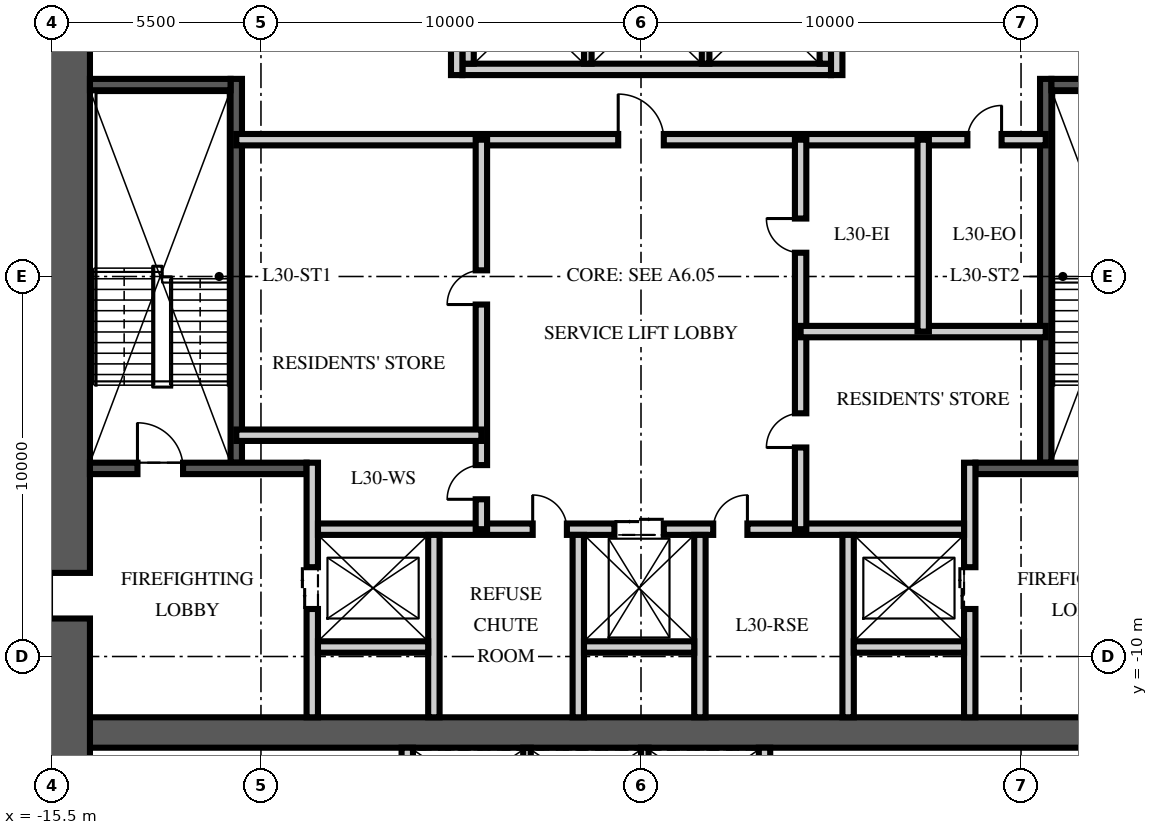
"""IFC4 building model, lengths in metres.
Left out: names, types, materials, properties, quantities, classifications, styles, units other than length and angle.
Written with IfcOpenShell. Run it as: python <this file> out.ifc"""

import sys

from ifc_helpers import new_model, si_unit, direction, frame, frame_2d, origin, place, context, subcontext, project, spatial, rectangle, extrude, element, fill, save


model = new_model("IFC4")
c1 = context("Model", 3, precision=1e-05, world=origin(), true_north=direction((0.0, 1.0)))
c2 = subcontext(c1, "Body", "Model", "MODEL_VIEW")
j1 = project(units=[si_unit("LENGTHUNIT", "METRE"), si_unit("PLANEANGLEUNIT", "RADIAN")], contexts=[c1])
p1 = place(None, origin())
s1 = spatial("IfcSite", under=j1, at=p1, CompositionType="ELEMENT")
p2 = place(p1, origin())
s2 = spatial("IfcBuilding", under=s1, at=p2, CompositionType="ELEMENT")
p3 = place(p2, frame((0.0, 0.0, 122.25)))
s3 = spatial("IfcBuildingStorey", under=s2, at=p3, CompositionType="ELEMENT", Elevation=122.25)
p4 = place(p3, frame((-15.5, -12.0, -0.25), z_axis=(0.0, 0.0, 1.0), x_axis=(1.0, 0.0, 0.0)))
e1 = element("IfcWall", 1, at=p4, inside=s3, PredefinedType="SHEAR", context=c2, shape_type="SweptSolid", body=[
    extrude(rectangle(XDim=31.0, YDim=0.8, at=frame_2d((15.5, 0.0))), origin(), (0.0, 0.0, 1.0), 3.75),
])
p5 = place(p3, frame((-15.5, -15.5, -0.25), z_axis=(0.0, 0.0, 1.0), x_axis=(0.0, 1.0, 0.0)))
e2 = element("IfcWall", 2, at=p5, inside=s3, PredefinedType="SHEAR", context=c2, shape_type="SweptSolid", body=[
    extrude(rectangle(XDim=31.0, YDim=2.0, at=frame_2d((15.5, 0.0))), origin(), (0.0, 0.0, 1.0), 3.75),
])
p6 = place(p5, frame((6.5, 0.0, 0.25)))
e3 = element("IfcOpeningElement", 3, at=p6, cuts=e2, PredefinedType="OPENING", context=c2, shape_type="SweptSolid", body=[
    extrude(rectangle(XDim=1.2, YDim=2.1, at=frame_2d((0.6, 1.05))), frame((0.0, 1.01, 0.0), z_axis=(0.0, -1.0, 0.0), x_axis=(1.0, 0.0, 0.0)), (0.0, 0.0, 1.0), 2.02),
])
p7 = place(p5, frame((23.0, 0.0, 0.25)))
e4 = element("IfcOpeningElement", 4, at=p7, cuts=e2, PredefinedType="OPENING", context=c2, shape_type="SweptSolid", body=[
    extrude(rectangle(XDim=1.8, YDim=2.1, at=frame_2d((0.9, 1.05))), frame((0.0, 1.01, 0.0), z_axis=(0.0, -1.0, 0.0), x_axis=(1.0, 0.0, 0.0)), (0.0, 0.0, 1.0), 2.02),
])
p8 = place(p3, frame((-10.65, -4.9, 0.0), z_axis=(0.0, 0.0, 1.0), x_axis=(0.0, 1.0, 0.0)))
e5 = element("IfcWall", 5, at=p8, inside=s3, PredefinedType="SOLIDWALL", context=c2, shape_type="SweptSolid", body=[
    extrude(rectangle(XDim=10.1, YDim=0.3, at=frame_2d((5.05, 0.0))), origin(), (0.0, 0.0, 1.0), 3.5),
])
p9 = place(p3, frame((-14.5, -5.05, 0.0), z_axis=(0.0, 0.0, 1.0), x_axis=(1.0, 0.0, 0.0)))
e6 = element("IfcWall", 6, at=p9, inside=s3, PredefinedType="SOLIDWALL", context=c2, shape_type="SweptSolid", body=[
    extrude(rectangle(XDim=5.7, YDim=0.3, at=frame_2d((2.85, 0.0))), origin(), (0.0, 0.0, 1.0), 3.5),
])
p10 = place(p9, frame((1.25, 0.0, 0.0)))
e7 = element("IfcOpeningElement", 7, at=p10, cuts=e6, PredefinedType="OPENING", context=c2, shape_type="SweptSolid", body=[
    extrude(rectangle(XDim=1.2, YDim=2.1, at=frame_2d((0.6, 1.05))), frame((0.0, 0.16, 0.0), z_axis=(0.0, -1.0, 0.0), x_axis=(1.0, 0.0, 0.0)), (0.0, 0.0, 1.0), 0.32),
])
p11 = place(p3, frame((-14.5, 5.05, 0.0), z_axis=(0.0, 0.0, 1.0), x_axis=(1.0, 0.0, 0.0)))
e8 = element("IfcWall", 8, at=p11, inside=s3, PredefinedType="SOLIDWALL", context=c2, shape_type="SweptSolid", body=[
    extrude(rectangle(XDim=3.7, YDim=0.3, at=frame_2d((1.85, 0.0))), origin(), (0.0, 0.0, 1.0), 3.5),
])
p12 = place(p3, frame((-8.65, -11.6, 0.0), z_axis=(0.0, 0.0, 1.0), x_axis=(0.0, 1.0, 0.0)))
e9 = element("IfcWall", 9, at=p12, inside=s3, PredefinedType="PARTITIONING", context=c2, shape_type="SweptSolid", body=[
    extrude(rectangle(XDim=6.7, YDim=0.3, at=frame_2d((3.35, 0.0))), origin(), (0.0, 0.0, 1.0), 3.5),
])
p13 = place(p12, frame((2.85, 0.0, 0.0)))
e10 = element("IfcOpeningElement", 10, at=p13, cuts=e9, PredefinedType="OPENING", context=c2, shape_type="SweptSolid", body=[
    extrude(rectangle(XDim=1.1, YDim=2.1, at=frame_2d((0.55, 1.05))), frame((0.0, 0.16, 0.0), z_axis=(0.0, -1.0, 0.0), x_axis=(1.0, 0.0, 0.0)), (0.0, 0.0, 1.0), 0.32),
])
p14 = place(p3, frame((10.65, -4.9, 0.0), z_axis=(0.0, 0.0, 1.0), x_axis=(0.0, 1.0, 0.0)))
e11 = element("IfcWall", 11, at=p14, inside=s3, PredefinedType="SOLIDWALL", context=c2, shape_type="SweptSolid", body=[
    extrude(rectangle(XDim=10.1, YDim=0.3, at=frame_2d((5.05, 0.0))), origin(), (0.0, 0.0, 1.0), 3.5),
])
p15 = place(p3, frame((14.5, -5.05, 0.0), z_axis=(0.0, 0.0, 1.0), x_axis=(-1.0, 0.0, 0.0)))
e12 = element("IfcWall", 12, at=p15, inside=s3, PredefinedType="SOLIDWALL", context=c2, shape_type="SweptSolid", body=[
    extrude(rectangle(XDim=5.7, YDim=0.3, at=frame_2d((2.85, 0.0))), origin(), (0.0, 0.0, 1.0), 3.5),
])
p16 = place(p15, frame((1.25, 0.0, 0.0)))
e13 = element("IfcOpeningElement", 13, at=p16, cuts=e12, PredefinedType="OPENING", context=c2, shape_type="SweptSolid", body=[
    extrude(rectangle(XDim=1.2, YDim=2.1, at=frame_2d((0.6, 1.05))), frame((0.0, 0.16, 0.0), z_axis=(0.0, -1.0, 0.0), x_axis=(1.0, 0.0, 0.0)), (0.0, 0.0, 1.0), 0.32),
])
p17 = place(p3, frame((14.5, 5.05, 0.0), z_axis=(0.0, 0.0, 1.0), x_axis=(-1.0, 0.0, 0.0)))
e14 = element("IfcWall", 14, at=p17, inside=s3, PredefinedType="SOLIDWALL", context=c2, shape_type="SweptSolid", body=[
    extrude(rectangle(XDim=3.7, YDim=0.3, at=frame_2d((1.85, 0.0))), origin(), (0.0, 0.0, 1.0), 3.5),
])
p18 = place(p3, frame((8.65, -11.6, 0.0), z_axis=(0.0, 0.0, 1.0), x_axis=(0.0, 1.0, 0.0)))
e15 = element("IfcWall", 15, at=p18, inside=s3, PredefinedType="PARTITIONING", context=c2, shape_type="SweptSolid", body=[
    extrude(rectangle(XDim=6.7, YDim=0.3, at=frame_2d((3.35, 0.0))), origin(), (0.0, 0.0, 1.0), 3.5),
])
p19 = place(p18, frame((2.85, 0.0, 0.0)))
e16 = element("IfcOpeningElement", 16, at=p19, cuts=e15, PredefinedType="OPENING", context=c2, shape_type="SweptSolid", body=[
    extrude(rectangle(XDim=1.1, YDim=2.1, at=frame_2d((0.55, 1.05))), frame((0.0, 0.16, 0.0), z_axis=(0.0, -1.0, 0.0), x_axis=(1.0, 0.0, 0.0)), (0.0, 0.0, 1.0), 0.32),
])
p20 = place(p3, frame((-8.5, -6.65, 0.0), z_axis=(0.0, 0.0, 1.0), x_axis=(1.0, 0.0, 0.0)))
e17 = element("IfcWall", 17, at=p20, inside=s3, PredefinedType="PARTITIONING", context=c2, shape_type="SweptSolid", body=[
    extrude(rectangle(XDim=17.0, YDim=0.3, at=frame_2d((8.5, 0.0))), origin(), (0.0, 0.0, 1.0), 3.5),
])
p21 = place(p20, frame((7.8, 0.0, 0.0)))
e18 = element("IfcOpeningElement", 18, at=p21, cuts=e17, PredefinedType="OPENING", context=c2, shape_type="SweptSolid", body=[
    extrude(rectangle(XDim=1.3, YDim=2.4, at=frame_2d((0.65, 1.2))), frame((0.0, 0.16, 0.0), z_axis=(0.0, -1.0, 0.0), x_axis=(1.0, 0.0, 0.0)), (0.0, 0.0, 1.0), 0.32),
])
p22 = place(p20, frame((5.65, 0.0, 0.0)))
e19 = element("IfcOpeningElement", 19, at=p22, cuts=e17, PredefinedType="OPENING", context=c2, shape_type="SweptSolid", body=[
    extrude(rectangle(XDim=0.9, YDim=2.1, at=frame_2d((0.45, 1.05))), frame((0.0, 0.16, 0.0), z_axis=(0.0, -1.0, 0.0), x_axis=(1.0, 0.0, 0.0)), (0.0, 0.0, 1.0), 0.32),
])
p23 = place(p20, frame((10.4, 0.0, 0.0)))
e20 = element("IfcOpeningElement", 20, at=p23, cuts=e17, PredefinedType="OPENING", context=c2, shape_type="SweptSolid", body=[
    extrude(rectangle(XDim=0.9, YDim=2.1, at=frame_2d((0.45, 1.05))), frame((0.0, 0.16, 0.0), z_axis=(0.0, -1.0, 0.0), x_axis=(1.0, 0.0, 0.0)), (0.0, 0.0, 1.0), 0.32),
])
for number, where, z_axis, x_axis in (
    (21, (-5.45, -11.6, 0.0), (0.0, 0.0, 1.0), (0.0, 1.0, 0.0)),
    (22, (-1.65, -11.6, 0.0), (0.0, 0.0, 1.0), (0.0, 1.0, 0.0)),
    (23, (1.55, -11.6, 0.0), (0.0, 0.0, 1.0), (0.0, 1.0, 0.0)),
    (24, (5.45, -11.6, 0.0), (0.0, 0.0, 1.0), (0.0, 1.0, 0.0)),
):
    element("IfcWall", number, at=place(p3, frame(where, z_axis=z_axis, x_axis=x_axis)), inside=s3, PredefinedType="PARTITIONING", context=c2, shape_type="SweptSolid", body=[
        extrude(rectangle(XDim=4.8, YDim=0.3, at=frame_2d((2.4, 0.0))), origin(), (0.0, 0.0, 1.0), 3.5),
    ])
for number, where, z_axis, x_axis in (
    (25, (-8.5, -9.75, 0.0), (0.0, 0.0, 1.0), (1.0, 0.0, 0.0)),
    (26, (-1.5, -9.75, 0.0), (0.0, 0.0, 1.0), (1.0, 0.0, 0.0)),
    (27, (5.6, -9.75, 0.0), (0.0, 0.0, 1.0), (1.0, 0.0, 0.0)),
):
    element("IfcWall", number, at=place(p3, frame(where, z_axis=z_axis, x_axis=x_axis)), inside=s3, PredefinedType="PARTITIONING", context=c2, shape_type="SweptSolid", body=[
        extrude(rectangle(XDim=2.9, YDim=0.3, at=frame_2d((1.45, 0.0))), origin(), (0.0, 0.0, 1.0), 3.5),
    ])
p24 = place(p3, frame((-4.7, 5.45, 0.0), z_axis=(0.0, 0.0, 1.0), x_axis=(1.0, 0.0, 0.0)))
e28 = element("IfcWall", 28, at=p24, inside=s3, PredefinedType="PARTITIONING", context=c2, shape_type="SweptSolid", body=[
    extrude(rectangle(XDim=9.7, YDim=0.3, at=frame_2d((4.85, 0.0))), origin(), (0.0, 0.0, 1.0), 3.5),
])
for number, where, z_axis, x_axis in (
    (29, (-4.55, 5.6, 0.0), (0.0, 0.0, 1.0), (0.0, 1.0, 0.0)),
    (30, (4.85, 5.6, 0.0), (0.0, 0.0, 1.0), (0.0, 1.0, 0.0)),
):
    element("IfcWall", number, at=place(p3, frame(where, z_axis=z_axis, x_axis=x_axis)), inside=s3, PredefinedType="PARTITIONING", context=c2, shape_type="SweptSolid", body=[
        extrude(rectangle(XDim=2.8, YDim=0.3, at=frame_2d((1.4, 0.0))), origin(), (0.0, 0.0, 1.0), 3.5),
    ])
for number, where, z_axis, x_axis in (
    (31, (-1.4, 5.6, 0.0), (0.0, 0.0, 1.0), (0.0, 1.0, 0.0)),
    (32, (1.7, 5.6, 0.0), (0.0, 0.0, 1.0), (0.0, 1.0, 0.0)),
):
    element("IfcWall", number, at=place(p3, frame(where, z_axis=z_axis, x_axis=x_axis)), inside=s3, PredefinedType="PARTITIONING", context=c2, shape_type="SweptSolid", body=[
        extrude(rectangle(XDim=2.8, YDim=0.2, at=frame_2d((1.4, 0.0))), origin(), (0.0, 0.0, 1.0), 3.5),
    ])
for number, where, z_axis, x_axis in (
    (33, (-6.15, -14.5, 0.0), (0.0, 0.0, 1.0), (0.0, 1.0, 0.0)),
    (34, (3.25, -14.5, 0.0), (0.0, 0.0, 1.0), (0.0, 1.0, 0.0)),
):
    element("IfcWall", number, at=place(p3, frame(where, z_axis=z_axis, x_axis=x_axis)), inside=s3, PredefinedType="PARTITIONING", context=c2, shape_type="SweptSolid", body=[
        extrude(rectangle(XDim=2.1, YDim=0.3, at=frame_2d((1.05, 0.0))), origin(), (0.0, 0.0, 1.0), 3.5),
    ])
for number, where, z_axis, x_axis in (
    (35, (-3.0, -14.5, 0.0), (0.0, 0.0, 1.0), (0.0, 1.0, 0.0)),
    (36, (0.1, -14.5, 0.0), (0.0, 0.0, 1.0), (0.0, 1.0, 0.0)),
):
    element("IfcWall", number, at=place(p3, frame(where, z_axis=z_axis, x_axis=x_axis)), inside=s3, PredefinedType="PARTITIONING", context=c2, shape_type="SweptSolid", body=[
        extrude(rectangle(XDim=2.1, YDim=0.2, at=frame_2d((1.05, 0.0))), origin(), (0.0, 0.0, 1.0), 3.5),
    ])
p25 = place(p3, frame((-10.65, 3.6, 0.0), z_axis=(0.0, 0.0, 1.0), x_axis=(1.0, 0.0, 0.0)))
e37 = element("IfcWall", 37, at=p25, inside=s3, PredefinedType="PARTITIONING", context=c2, shape_type="SweptSolid", body=[
    extrude(rectangle(XDim=21.3, YDim=0.3, at=frame_2d((10.65, 0.0))), origin(), (0.0, 0.0, 1.0), 3.5),
])
p26 = place(p25, frame((10.05, 0.0, 0.0)))
e38 = element("IfcOpeningElement", 38, at=p26, cuts=e37, PredefinedType="OPENING", context=c2, shape_type="SweptSolid", body=[
    extrude(rectangle(XDim=1.2, YDim=2.1, at=frame_2d((0.6, 1.05))), frame((0.0, 0.16, 0.0), z_axis=(0.0, -1.0, 0.0), x_axis=(1.0, 0.0, 0.0)), (0.0, 0.0, 1.0), 0.32),
])
p27 = place(p25, frame((19.238, 0.0, 0.0)))
e39 = element("IfcOpeningElement", 39, at=p27, cuts=e37, PredefinedType="OPENING", context=c2, shape_type="SweptSolid", body=[
    extrude(rectangle(XDim=0.9, YDim=2.1, at=frame_2d((0.45, 1.05))), frame((0.0, 0.16, 0.0), z_axis=(0.0, -1.0, 0.0), x_axis=(1.0, 0.0, 0.0)), (0.0, 0.0, 1.0), 0.32),
])
p28 = place(p3, frame((-4.2, -6.65, 0.0), z_axis=(0.0, 0.0, 1.0), x_axis=(0.0, 1.0, 0.0)))
e40 = element("IfcWall", 40, at=p28, inside=s3, PredefinedType="PARTITIONING", context=c2, shape_type="SweptSolid", body=[
    extrude(rectangle(XDim=10.25, YDim=0.3, at=frame_2d((5.125, 0.0))), origin(), (0.0, 0.0, 1.0), 3.5),
])
p29 = place(p28, frame((0.787, 0.0, 0.0)))
e41 = element("IfcOpeningElement", 41, at=p29, cuts=e40, PredefinedType="OPENING", context=c2, shape_type="SweptSolid", body=[
    extrude(rectangle(XDim=0.9, YDim=2.1, at=frame_2d((0.45, 1.05))), frame((0.0, 0.16, 0.0), z_axis=(0.0, -1.0, 0.0), x_axis=(1.0, 0.0, 0.0)), (0.0, 0.0, 1.0), 0.32),
])
p30 = place(p28, frame((5.912, 0.0, 0.0)))
e42 = element("IfcOpeningElement", 42, at=p30, cuts=e40, PredefinedType="OPENING", context=c2, shape_type="SweptSolid", body=[
    extrude(rectangle(XDim=0.9, YDim=2.1, at=frame_2d((0.45, 1.05))), frame((0.0, 0.16, 0.0), z_axis=(0.0, -1.0, 0.0), x_axis=(1.0, 0.0, 0.0)), (0.0, 0.0, 1.0), 0.32),
])
p31 = place(p3, frame((4.2, -6.65, 0.0), z_axis=(0.0, 0.0, 1.0), x_axis=(0.0, 1.0, 0.0)))
e43 = element("IfcWall", 43, at=p31, inside=s3, PredefinedType="PARTITIONING", context=c2, shape_type="SweptSolid", body=[
    extrude(rectangle(XDim=10.25, YDim=0.3, at=frame_2d((5.125, 0.0))), origin(), (0.0, 0.0, 1.0), 3.5),
])
p32 = place(p31, frame((2.15, 0.0, 0.0)))
e44 = element("IfcOpeningElement", 44, at=p32, cuts=e43, PredefinedType="OPENING", context=c2, shape_type="SweptSolid", body=[
    extrude(rectangle(XDim=0.9, YDim=2.1, at=frame_2d((0.45, 1.05))), frame((0.0, 0.16, 0.0), z_axis=(0.0, -1.0, 0.0), x_axis=(1.0, 0.0, 0.0)), (0.0, 0.0, 1.0), 0.32),
])
p33 = place(p31, frame((7.275, 0.0, 0.0)))
e45 = element("IfcOpeningElement", 45, at=p33, cuts=e43, PredefinedType="OPENING", context=c2, shape_type="SweptSolid", body=[
    extrude(rectangle(XDim=0.9, YDim=2.1, at=frame_2d((0.45, 1.05))), frame((0.0, 0.16, 0.0), z_axis=(0.0, -1.0, 0.0), x_axis=(1.0, 0.0, 0.0)), (0.0, 0.0, 1.0), 0.32),
])
for number, where, z_axis, x_axis in (
    (46, (-10.65, -4.177, 0.0), (0.0, 0.0, 1.0), (1.0, 0.0, 0.0)),
    (47, (10.65, -1.45, 0.0), (0.0, 0.0, 1.0), (-1.0, 0.0, 0.0)),
):
    element("IfcWall", number, at=place(p3, frame(where, z_axis=z_axis, x_axis=x_axis)), inside=s3, PredefinedType="PARTITIONING", context=c2, shape_type="SweptSolid", body=[
        extrude(rectangle(XDim=6.45, YDim=0.3, at=frame_2d((3.225, 0.0))), origin(), (0.0, 0.0, 1.0), 3.5),
    ])
p34 = place(p3, frame((7.425, -1.45, 0.0), z_axis=(0.0, 0.0, 1.0), x_axis=(0.0, 1.0, 0.0)))
e48 = element("IfcWall", 48, at=p34, inside=s3, PredefinedType="PARTITIONING", context=c2, shape_type="SweptSolid", body=[
    extrude(rectangle(XDim=5.05, YDim=0.3, at=frame_2d((2.525, 0.0))), origin(), (0.0, 0.0, 1.0), 3.5),
])
p35 = place(p3, frame((-4.85, 5.3, 0.0), z_axis=(0.0, 0.0, 1.0), x_axis=(0.0, 1.0, 0.0)))
e49 = element("IfcWall", 49, at=p35, inside=s3, PredefinedType="PARTITIONING", context=c2, shape_type="SweptSolid", body=[
    extrude(rectangle(XDim=6.3, YDim=0.3, at=frame_2d((3.15, 0.0))), origin(), (0.0, 0.0, 1.0), 3.5),
])
p36 = place(p35, frame((4.35, 0.0, 0.0)))
e50 = element("IfcOpeningElement", 50, at=p36, cuts=e49, PredefinedType="OPENING", context=c2, shape_type="SweptSolid", body=[
    extrude(rectangle(XDim=0.9, YDim=2.1, at=frame_2d((0.45, 1.05))), frame((0.0, 0.16, 0.0), z_axis=(0.0, -1.0, 0.0), x_axis=(1.0, 0.0, 0.0)), (0.0, 0.0, 1.0), 0.32),
])
p37 = place(p3, frame((5.15, 5.3, 0.0), z_axis=(0.0, 0.0, 1.0), x_axis=(0.0, 1.0, 0.0)))
e51 = element("IfcWall", 51, at=p37, inside=s3, PredefinedType="PARTITIONING", context=c2, shape_type="SweptSolid", body=[
    extrude(rectangle(XDim=6.3, YDim=0.3, at=frame_2d((3.15, 0.0))), origin(), (0.0, 0.0, 1.0), 3.5),
])
p38 = place(p37, frame((4.35, 0.0, 0.0)))
e52 = element("IfcOpeningElement", 52, at=p38, cuts=e51, PredefinedType="OPENING", context=c2, shape_type="SweptSolid", body=[
    extrude(rectangle(XDim=0.9, YDim=2.1, at=frame_2d((0.45, 1.05))), frame((0.0, 0.16, 0.0), z_axis=(0.0, -1.0, 0.0), x_axis=(1.0, 0.0, 0.0)), (0.0, 0.0, 1.0), 0.32),
])
p39 = place(p10, origin())
e53 = element("IfcDoor", 53, at=p39, inside=s3, OperationType="SINGLE_SWING_LEFT", PredefinedType="DOOR", context=c2, shape_type="SweptSolid", body=[
    extrude(rectangle(XDim=1.2, YDim=2.1, at=frame_2d((0.6, 1.05))), frame((0.0, 0.025, 0.0), z_axis=(0.0, -1.0, 0.0), x_axis=(1.0, 0.0, 0.0)), (0.0, 0.0, 1.0), 0.05),
])
fill(e7, e53)
p40 = place(p6, origin())
e54 = element("IfcDoor", 54, at=p40, inside=s3, OperationType="SINGLE_SWING_LEFT", PredefinedType="DOOR", context=c2, shape_type="SweptSolid", body=[
    extrude(rectangle(XDim=1.2, YDim=2.1, at=frame_2d((0.6, 1.05))), frame((0.0, 0.025, 0.0), z_axis=(0.0, -1.0, 0.0), x_axis=(1.0, 0.0, 0.0)), (0.0, 0.0, 1.0), 0.05),
])
fill(e3, e54)
p41 = place(p13, origin())
e55 = element("IfcDoor", 55, at=p41, inside=s3, OperationType="DOUBLE_DOOR_SLIDING", PredefinedType="DOOR", context=c2, shape_type="SweptSolid", body=[
    extrude(rectangle(XDim=1.1, YDim=2.1, at=frame_2d((0.55, 1.05))), frame((0.0, 0.025, 0.0), z_axis=(0.0, -1.0, 0.0), x_axis=(1.0, 0.0, 0.0)), (0.0, 0.0, 1.0), 0.05),
])
fill(e10, e55)
p42 = place(p19, origin())
e56 = element("IfcDoor", 56, at=p42, inside=s3, OperationType="DOUBLE_DOOR_SLIDING", PredefinedType="DOOR", context=c2, shape_type="SweptSolid", body=[
    extrude(rectangle(XDim=1.1, YDim=2.1, at=frame_2d((0.55, 1.05))), frame((0.0, 0.025, 0.0), z_axis=(0.0, -1.0, 0.0), x_axis=(1.0, 0.0, 0.0)), (0.0, 0.0, 1.0), 0.05),
])
fill(e16, e56)
p43 = place(p21, origin())
e57 = element("IfcDoor", 57, at=p43, inside=s3, OperationType="DOUBLE_DOOR_SLIDING", PredefinedType="DOOR", context=c2, shape_type="SweptSolid", body=[
    extrude(rectangle(XDim=1.3, YDim=2.4, at=frame_2d((0.65, 1.2))), frame((0.0, 0.025, 0.0), z_axis=(0.0, -1.0, 0.0), x_axis=(1.0, 0.0, 0.0)), (0.0, 0.0, 1.0), 0.05),
])
fill(e18, e57)
p44 = place(p26, origin())
e58 = element("IfcDoor", 58, at=p44, inside=s3, OperationType="SINGLE_SWING_LEFT", PredefinedType="DOOR", context=c2, shape_type="SweptSolid", body=[
    extrude(rectangle(XDim=1.2, YDim=2.1, at=frame_2d((0.6, 1.05))), frame((0.0, 0.025, 0.0), z_axis=(0.0, -1.0, 0.0), x_axis=(1.0, 0.0, 0.0)), (0.0, 0.0, 1.0), 0.05),
])
fill(e38, e58)
p45 = place(p22, origin())
e59 = element("IfcDoor", 59, at=p45, inside=s3, OperationType="SINGLE_SWING_LEFT", PredefinedType="DOOR", context=c2, shape_type="SweptSolid", body=[
    extrude(rectangle(XDim=0.9, YDim=2.1, at=frame_2d((0.45, 1.05))), frame((0.0, 0.025, 0.0), z_axis=(0.0, -1.0, 0.0), x_axis=(1.0, 0.0, 0.0)), (0.0, 0.0, 1.0), 0.05),
])
fill(e19, e59)
p46 = place(p23, origin())
e60 = element("IfcDoor", 60, at=p46, inside=s3, OperationType="SINGLE_SWING_RIGHT", PredefinedType="DOOR", context=c2, shape_type="SweptSolid", body=[
    extrude(rectangle(XDim=0.9, YDim=2.1, at=frame_2d((0.45, 1.05))), frame((0.0, 0.025, 0.0), z_axis=(0.0, -1.0, 0.0), x_axis=(1.0, 0.0, 0.0)), (0.0, 0.0, 1.0), 0.05),
])
fill(e20, e60)
p47 = place(p29, origin())
e61 = element("IfcDoor", 61, at=p47, inside=s3, OperationType="SINGLE_SWING_LEFT", PredefinedType="DOOR", context=c2, shape_type="SweptSolid", body=[
    extrude(rectangle(XDim=0.9, YDim=2.1, at=frame_2d((0.45, 1.05))), frame((0.0, 0.025, 0.0), z_axis=(0.0, -1.0, 0.0), x_axis=(1.0, 0.0, 0.0)), (0.0, 0.0, 1.0), 0.05),
])
fill(e41, e61)
p48 = place(p30, origin())
e62 = element("IfcDoor", 62, at=p48, inside=s3, OperationType="SINGLE_SWING_LEFT", PredefinedType="DOOR", context=c2, shape_type="SweptSolid", body=[
    extrude(rectangle(XDim=0.9, YDim=2.1, at=frame_2d((0.45, 1.05))), frame((0.0, 0.025, 0.0), z_axis=(0.0, -1.0, 0.0), x_axis=(1.0, 0.0, 0.0)), (0.0, 0.0, 1.0), 0.05),
])
fill(e42, e62)
p49 = place(p32, origin())
e63 = element("IfcDoor", 63, at=p49, inside=s3, OperationType="SINGLE_SWING_LEFT", PredefinedType="DOOR", context=c2, shape_type="SweptSolid", body=[
    extrude(rectangle(XDim=0.9, YDim=2.1, at=frame_2d((0.45, 1.05))), frame((0.0, 0.025, 0.0), z_axis=(0.0, -1.0, 0.0), x_axis=(1.0, 0.0, 0.0)), (0.0, 0.0, 1.0), 0.05),
])
fill(e44, e63)
p50 = place(p33, origin())
e64 = element("IfcDoor", 64, at=p50, inside=s3, OperationType="SINGLE_SWING_RIGHT", PredefinedType="DOOR", context=c2, shape_type="SweptSolid", body=[
    extrude(rectangle(XDim=0.9, YDim=2.1, at=frame_2d((0.45, 1.05))), frame((0.0, 0.025, 0.0), z_axis=(0.0, -1.0, 0.0), x_axis=(1.0, 0.0, 0.0)), (0.0, 0.0, 1.0), 0.05),
])
fill(e45, e64)
p51 = place(p27, origin())
e65 = element("IfcDoor", 65, at=p51, inside=s3, OperationType="SINGLE_SWING_RIGHT", PredefinedType="DOOR", context=c2, shape_type="SweptSolid", body=[
    extrude(rectangle(XDim=0.9, YDim=2.1, at=frame_2d((0.45, 1.05))), frame((0.0, 0.025, 0.0), z_axis=(0.0, -1.0, 0.0), x_axis=(1.0, 0.0, 0.0)), (0.0, 0.0, 1.0), 0.05),
])
fill(e39, e65)
save(model, sys.argv[1])
